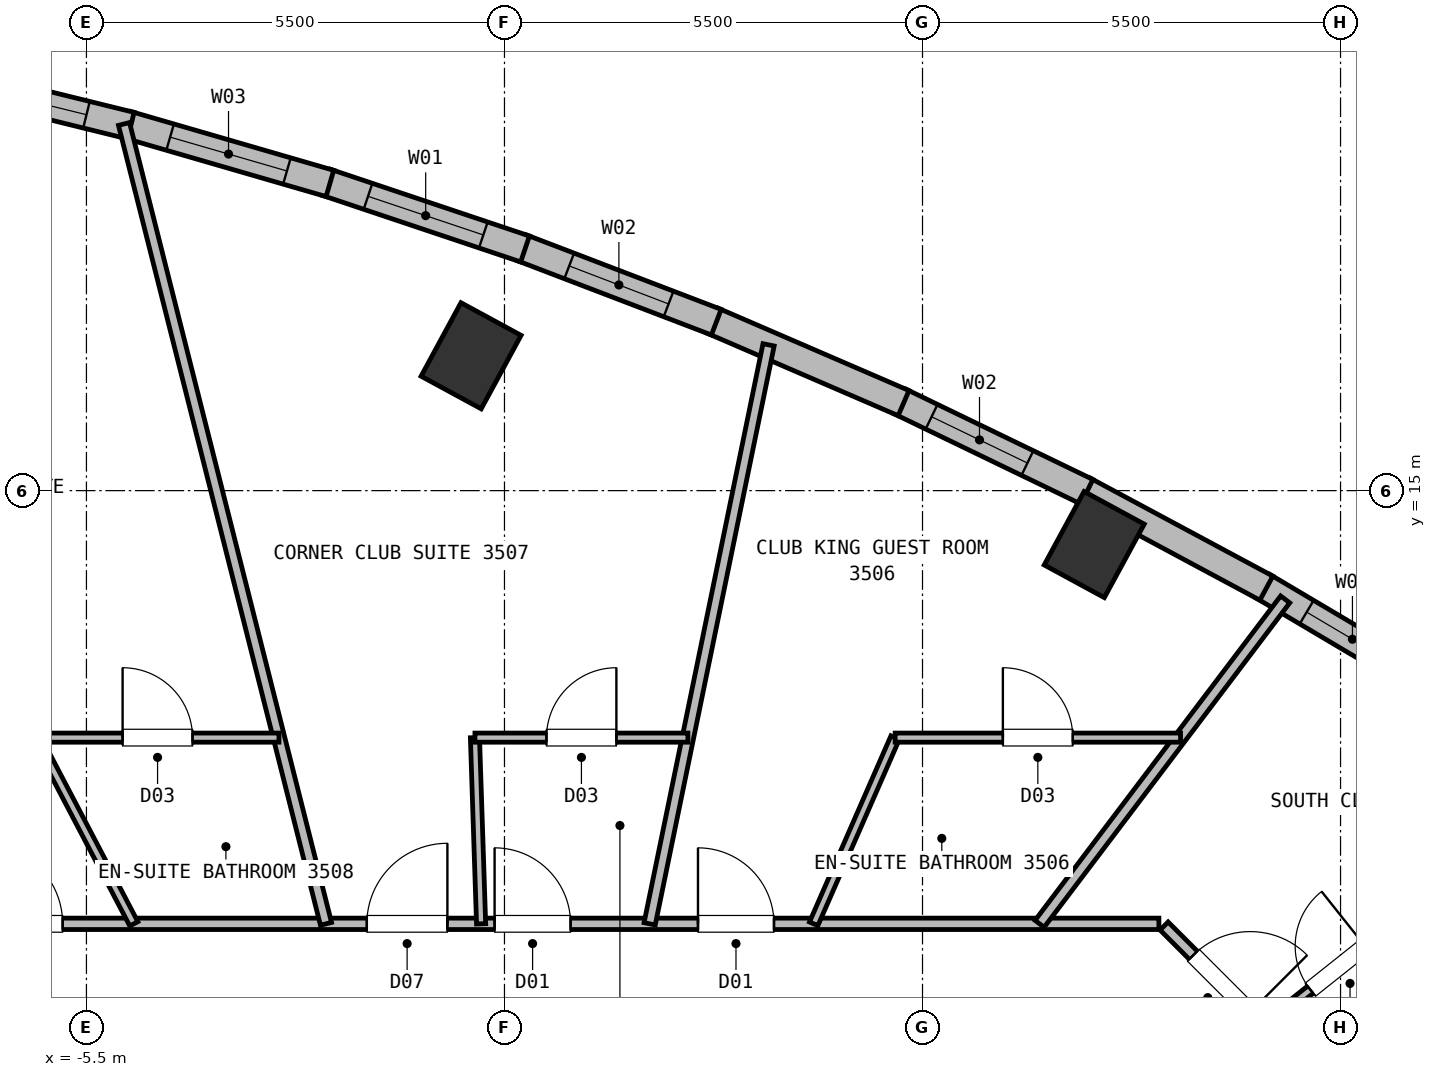
"""IFC4 building model, lengths in metres.
Left out: names, types, materials, properties, quantities, classifications, styles, units other than length and angle.
Written with IfcOpenShell. Run it as: python <this file> out.ifc"""

import sys

from ifc_helpers import new_model, si_unit, direction, frame, frame_2d, origin, origin_2d, place, context, subcontext, project, spatial, rectangle, extrude, element, fill, save


model = new_model("IFC4")
c1 = context("Model", 3, precision=1e-05, world=origin(), true_north=direction((0.0, 1.0)))
c2 = subcontext(c1, "Body", "Model", "MODEL_VIEW")
j1 = project(units=[si_unit("LENGTHUNIT", "METRE"), si_unit("PLANEANGLEUNIT", "RADIAN")], contexts=[c1])
p1 = place(None, origin())
s1 = spatial("IfcSite", under=j1, at=p1, CompositionType="ELEMENT")
p2 = place(p1, origin())
s2 = spatial("IfcBuilding", under=s1, at=p2, CompositionType="ELEMENT")
p3 = place(p2, frame((0.0, 0.0, 131.0)))
s3 = spatial("IfcBuildingStorey", under=s2, at=p3, CompositionType="ELEMENT", Elevation=131.0)
for number, where, z_axis, x_axis in (
    (1, (7.759, 14.29, 0.0), (0.0, 0.0, 1.0), (-0.879, 0.477, 0.0)),
    (2, (-0.439, 16.774, 0.0), (0.0, 0.0, 1.0), (-0.879, 0.477, 0.0)),
):
    element("IfcColumn", number, at=place(p3, frame(where, z_axis=z_axis, x_axis=x_axis)), inside=s3, PredefinedType="COLUMN", context=c2, shape_type="SweptSolid", body=[
        extrude(rectangle(XDim=0.9, YDim=1.1, at=origin_2d()), origin(), (0.0, 0.0, 1.0), 3.75),
    ])
p4 = place(p3, frame((9.98, 13.741, 0.0), z_axis=(0.0, 0.0, 1.0), x_axis=(0.860339389624, -0.509721624675, 0.0)))
e3 = element("IfcWall", 3, at=p4, inside=s3, PredefinedType="SOLIDWALL", context=c2, shape_type="SweptSolid", body=[
    extrude(rectangle(XDim=2.734, YDim=0.36, at=frame_2d((1.367, 0.0))), origin(), (0.0, 0.0, 1.0), 3.5),
])
p5 = place(p4, frame((0.667, 0.0, 0.72)))
e4 = element("IfcOpeningElement", 4, at=p5, cuts=e3, PredefinedType="OPENING", context=c2, shape_type="SweptSolid", body=[
    extrude(rectangle(XDim=1.4, YDim=1.84, at=frame_2d((0.7, 0.92))), frame((0.0, 0.19, 0.0), z_axis=(0.0, -1.0, 0.0), x_axis=(1.0, 0.0, 0.0)), (0.0, 0.0, 1.0), 0.38),
])
p6 = place(p3, frame((7.619, 15.008, 0.0), z_axis=(0.0, 0.0, 1.0), x_axis=(0.881156632258, -0.472824480572, 0.0)))
e5 = element("IfcWall", 5, at=p6, inside=s3, PredefinedType="SOLIDWALL", context=c2, shape_type="SweptSolid", body=[
    extrude(rectangle(XDim=2.729, YDim=0.36, at=frame_2d((1.365, 0.0))), origin(), (0.0, 0.0, 1.0), 3.5),
])
p7 = place(p3, frame((5.205, 16.172, 0.0), z_axis=(0.0, 0.0, 1.0), x_axis=(0.900444136685, -0.434971673458, 0.0)))
e6 = element("IfcWall", 6, at=p7, inside=s3, PredefinedType="SOLIDWALL", context=c2, shape_type="SweptSolid", body=[
    extrude(rectangle(XDim=2.729, YDim=0.36, at=frame_2d((1.365, 0.0))), origin(), (0.0, 0.0, 1.0), 3.5),
])
p8 = place(p7, frame((0.46, 0.0, 0.72)))
e7 = element("IfcOpeningElement", 7, at=p8, cuts=e6, PredefinedType="OPENING", context=c2, shape_type="SweptSolid", body=[
    extrude(rectangle(XDim=1.4, YDim=1.84, at=frame_2d((0.7, 0.92))), frame((0.0, 0.19, 0.0), z_axis=(0.0, -1.0, 0.0), x_axis=(1.0, 0.0, 0.0)), (0.0, 0.0, 1.0), 0.38),
])
p9 = place(p3, frame((2.74, 17.235, 0.0), z_axis=(0.0, 0.0, 1.0), x_axis=(0.918107397743, -0.396331687113, 0.0)))
e8 = element("IfcWall", 8, at=p9, inside=s3, PredefinedType="SOLIDWALL", context=c2, shape_type="SweptSolid", body=[
    extrude(rectangle(XDim=2.734, YDim=0.36, at=frame_2d((1.367, 0.0))), origin(), (0.0, 0.0, 1.0), 3.5),
])
p10 = place(p3, frame((0.224, 18.197, 0.0), z_axis=(0.0, 0.0, 1.0), x_axis=(0.933979359079, -0.357326960661, 0.0)))
e9 = element("IfcWall", 9, at=p10, inside=s3, PredefinedType="SOLIDWALL", context=c2, shape_type="SweptSolid", body=[
    extrude(rectangle(XDim=2.744, YDim=0.36, at=frame_2d((1.372, 0.0))), origin(), (0.0, 0.0, 1.0), 3.5),
])
p11 = place(p10, frame((0.672, 0.0, 0.72)))
e10 = element("IfcOpeningElement", 10, at=p11, cuts=e9, PredefinedType="OPENING", context=c2, shape_type="SweptSolid", body=[
    extrude(rectangle(XDim=1.4, YDim=1.84, at=frame_2d((0.7, 0.92))), frame((0.0, 0.19, 0.0), z_axis=(0.0, -1.0, 0.0), x_axis=(1.0, 0.0, 0.0)), (0.0, 0.0, 1.0), 0.38),
])
p12 = place(p3, frame((-2.344, 19.057, 0.0), z_axis=(0.0, 0.0, 1.0), x_axis=(0.948124259455, -0.317899966393, 0.0)))
e11 = element("IfcWall", 11, at=p12, inside=s3, PredefinedType="SOLIDWALL", context=c2, shape_type="SweptSolid", body=[
    extrude(rectangle(XDim=2.759, YDim=0.36, at=frame_2d((1.379, 0.0))), origin(), (0.0, 0.0, 1.0), 3.5),
])
p13 = place(p12, frame((0.579, 0.0, 0.72)))
e12 = element("IfcOpeningElement", 12, at=p13, cuts=e11, PredefinedType="OPENING", context=c2, shape_type="SweptSolid", body=[
    extrude(rectangle(XDim=1.6, YDim=1.88, at=frame_2d((0.8, 0.94))), frame((0.0, 0.19, 0.0), z_axis=(0.0, -1.0, 0.0), x_axis=(1.0, 0.0, 0.0)), (0.0, 0.0, 1.0), 0.38),
])
p14 = place(p3, frame((-4.964, 19.815, 0.0), z_axis=(0.0, 0.0, 1.0), x_axis=(0.960441835692, -0.278480664056, 0.0)))
e13 = element("IfcWall", 13, at=p14, inside=s3, PredefinedType="SOLIDWALL", context=c2, shape_type="SweptSolid", body=[
    extrude(rectangle(XDim=2.777, YDim=0.36, at=frame_2d((1.389, 0.0))), origin(), (0.0, 0.0, 1.0), 3.5),
])
p15 = place(p14, frame((0.589, 0.0, 0.72)))
e14 = element("IfcOpeningElement", 14, at=p15, cuts=e13, PredefinedType="OPENING", context=c2, shape_type="SweptSolid", body=[
    extrude(rectangle(XDim=1.6, YDim=1.88, at=frame_2d((0.8, 0.94))), frame((0.0, 0.19, 0.0), z_axis=(0.0, -1.0, 0.0), x_axis=(1.0, 0.0, 0.0)), (0.0, 0.0, 1.0), 0.38),
])
p16 = place(p3, frame((-7.636, 20.472, 0.0), z_axis=(0.0, 0.0, 1.0), x_axis=(0.970982505779, -0.239150524716, 0.0)))
e15 = element("IfcWall", 15, at=p16, inside=s3, PredefinedType="SOLIDWALL", context=c2, shape_type="SweptSolid", body=[
    extrude(rectangle(XDim=2.801, YDim=0.36, at=frame_2d((1.401, 0.0))), origin(), (0.0, 0.0, 1.0), 3.5),
])
p17 = place(p16, frame((0.601, 0.0, 0.72)))
e16 = element("IfcOpeningElement", 16, at=p17, cuts=e15, PredefinedType="OPENING", context=c2, shape_type="SweptSolid", body=[
    extrude(rectangle(XDim=1.6, YDim=1.88, at=frame_2d((0.8, 0.94))), frame((0.0, 0.19, 0.0), z_axis=(0.0, -1.0, 0.0), x_axis=(1.0, 0.0, 0.0)), (0.0, 0.0, 1.0), 0.38),
])
p18 = place(p3, frame((8.678, 9.272, 0.0), z_axis=(0.0, 0.0, 1.0), x_axis=(0.707106781187, -0.707106781187, 0.0)))
e17 = element("IfcWall", 17, at=p18, inside=s3, PredefinedType="PARTITIONING", context=c2, shape_type="SweptSolid", body=[
    extrude(rectangle(XDim=2.89, YDim=0.15, at=frame_2d((1.445, 0.0))), origin(), (0.0, 0.0, 1.0), 3.5),
])
p19 = place(p18, frame((0.543, 0.0, 0.0)))
e18 = element("IfcOpeningElement", 18, at=p19, cuts=e17, PredefinedType="OPENING", context=c2, shape_type="SweptSolid", body=[
    extrude(rectangle(XDim=1.06, YDim=2.15, at=frame_2d((0.53, 1.075))), frame((0.0, 0.085, 0.0), z_axis=(0.0, -1.0, 0.0), x_axis=(1.0, 0.0, 0.0)), (0.0, 0.0, 1.0), 0.17),
])
p20 = place(p3, frame((-8.61, 9.3, 0.0), z_axis=(0.0, 0.0, 1.0), x_axis=(1.0, 0.0, 0.0)))
e19 = element("IfcWall", 19, at=p20, inside=s3, PredefinedType="PARTITIONING", context=c2, shape_type="SweptSolid", body=[
    extrude(rectangle(XDim=17.22, YDim=0.15, at=frame_2d((8.61, 0.0))), origin(), (0.0, 0.0, 1.0), 3.5),
])
p21 = place(p20, frame((11.156, 0.0, 0.0)))
e20 = element("IfcOpeningElement", 20, at=p21, cuts=e19, PredefinedType="OPENING", context=c2, shape_type="SweptSolid", body=[
    extrude(rectangle(XDim=1.0, YDim=2.15, at=frame_2d((0.5, 1.075))), frame((0.0, 0.085, 0.0), z_axis=(0.0, -1.0, 0.0), x_axis=(1.0, 0.0, 0.0)), (0.0, 0.0, 1.0), 0.17),
])
p22 = place(p20, frame((6.799, 0.0, 0.0)))
e21 = element("IfcOpeningElement", 21, at=p22, cuts=e19, PredefinedType="OPENING", context=c2, shape_type="SweptSolid", body=[
    extrude(rectangle(XDim=1.06, YDim=2.15, at=frame_2d((0.53, 1.075))), frame((0.0, 0.085, 0.0), z_axis=(0.0, -1.0, 0.0), x_axis=(1.0, 0.0, 0.0)), (0.0, 0.0, 1.0), 0.17),
])
p23 = place(p20, frame((1.737, 0.0, 0.0)))
e22 = element("IfcOpeningElement", 22, at=p23, cuts=e19, PredefinedType="OPENING", context=c2, shape_type="SweptSolid", body=[
    extrude(rectangle(XDim=1.06, YDim=2.15, at=frame_2d((0.53, 1.075))), frame((0.0, 0.085, 0.0), z_axis=(0.0, -1.0, 0.0), x_axis=(1.0, 0.0, 0.0)), (0.0, 0.0, 1.0), 0.17),
])
p24 = place(p20, frame((8.48, 0.0, 0.0)))
e23 = element("IfcOpeningElement", 23, at=p24, cuts=e19, PredefinedType="OPENING", context=c2, shape_type="SweptSolid", body=[
    extrude(rectangle(XDim=1.0, YDim=2.15, at=frame_2d((0.5, 1.075))), frame((0.0, 0.085, 0.0), z_axis=(0.0, -1.0, 0.0), x_axis=(1.0, 0.0, 0.0)), (0.0, 0.0, 1.0), 0.17),
])
p25 = place(p3, frame((10.75, 5.012, 0.0), z_axis=(0.0, 0.0, 1.0), x_axis=(0.90633944919, 0.422550355393, 0.0)))
e24 = element("IfcWall", 24, at=p25, inside=s3, PredefinedType="PARTITIONING", context=c2, shape_type="SweptSolid", body=[
    extrude(rectangle(XDim=7.977, YDim=0.15, at=frame_2d((3.989, 0.0))), origin(), (0.0, 0.0, 1.0), 3.5),
])
p26 = place(p3, frame((9.998, 7.952, 0.0), z_axis=(0.0, 0.0, 1.0), x_axis=(0.782652575374, 0.622458790813, 0.0)))
e25 = element("IfcWall", 25, at=p26, inside=s3, PredefinedType="PARTITIONING", context=c2, shape_type="SweptSolid", body=[
    extrude(rectangle(XDim=2.466, YDim=0.12, at=frame_2d((1.233, 0.0))), origin(), (0.0, 0.0, 1.0), 3.5),
])
p27 = place(p26, frame((0.773, 0.0, 0.0)))
e26 = element("IfcOpeningElement", 26, at=p27, cuts=e25, PredefinedType="OPENING", context=c2, shape_type="SweptSolid", body=[
    extrude(rectangle(XDim=0.92, YDim=2.1, at=frame_2d((0.46, 1.05))), frame((0.0, 0.07, 0.0), z_axis=(0.0, -1.0, 0.0), x_axis=(1.0, 0.0, 0.0)), (0.0, 0.0, 1.0), 0.14),
])
p28 = place(p3, frame((7.04, 9.3, 0.0), z_axis=(0.0, 0.0, 1.0), x_axis=(0.603561778398, 0.797316235667, 0.0)))
e27 = element("IfcWall", 27, at=p28, inside=s3, PredefinedType="PARTITIONING", context=c2, shape_type="SweptSolid", body=[
    extrude(rectangle(XDim=5.354, YDim=0.15, at=frame_2d((2.677, 0.0))), origin(), (0.0, 0.0, 1.0), 3.5),
])
p29 = place(p3, frame((4.068, 9.3, 0.0), z_axis=(0.0, 0.0, 1.0), x_axis=(0.400794887066, 0.916167811322, 0.0)))
e28 = element("IfcWall", 28, at=p29, inside=s3, PredefinedType="PARTITIONING", context=c2, shape_type="SweptSolid", body=[
    extrude(rectangle(XDim=2.674, YDim=0.12, at=frame_2d((1.337, 0.0))), origin(), (0.0, 0.0, 1.0), 3.5),
])
p30 = place(p3, frame((5.14, 11.75, 0.0), z_axis=(0.0, 0.0, 1.0), x_axis=(1.0, 0.0, 0.0)))
e29 = element("IfcWall", 29, at=p30, inside=s3, PredefinedType="PARTITIONING", context=c2, shape_type="SweptSolid", body=[
    extrude(rectangle(XDim=3.755, YDim=0.12, at=frame_2d((1.877, 0.0))), origin(), (0.0, 0.0, 1.0), 3.5),
])
p31 = place(p30, frame((1.417, 0.0, 0.0)))
e30 = element("IfcOpeningElement", 30, at=p31, cuts=e29, PredefinedType="OPENING", context=c2, shape_type="SweptSolid", body=[
    extrude(rectangle(XDim=0.92, YDim=2.1, at=frame_2d((0.46, 1.05))), frame((0.0, 0.07, 0.0), z_axis=(0.0, -1.0, 0.0), x_axis=(1.0, 0.0, 0.0)), (0.0, 0.0, 1.0), 0.14),
])
p32 = place(p3, frame((1.91, 9.3, 0.0), z_axis=(0.0, 0.0, 1.0), x_axis=(0.201190538841, 0.97955212576, 0.0)))
e31 = element("IfcWall", 31, at=p32, inside=s3, PredefinedType="PARTITIONING", context=c2, shape_type="SweptSolid", body=[
    extrude(rectangle(XDim=7.777, YDim=0.15, at=frame_2d((3.889, 0.0))), origin(), (0.0, 0.0, 1.0), 3.5),
])
p33 = place(p3, frame((-0.308, 9.3, 0.0), z_axis=(0.0, 0.0, 1.0), x_axis=(-0.032966625408, 0.999456453083, 0.0)))
e32 = element("IfcWall", 32, at=p33, inside=s3, PredefinedType="PARTITIONING", context=c2, shape_type="SweptSolid", body=[
    extrude(rectangle(XDim=2.451, YDim=0.12, at=frame_2d((1.226, 0.0))), origin(), (0.0, 0.0, 1.0), 3.5),
])
p34 = place(p3, frame((-0.388, 11.75, 0.0), z_axis=(0.0, 0.0, 1.0), x_axis=(1.0, 0.0, 0.0)))
e33 = element("IfcWall", 33, at=p34, inside=s3, PredefinedType="PARTITIONING", context=c2, shape_type="SweptSolid", body=[
    extrude(rectangle(XDim=2.802, YDim=0.12, at=frame_2d((1.401, 0.0))), origin(), (0.0, 0.0, 1.0), 3.5),
])
p35 = place(p34, frame((0.941, 0.0, 0.0)))
e34 = element("IfcOpeningElement", 34, at=p35, cuts=e33, PredefinedType="OPENING", context=c2, shape_type="SweptSolid", body=[
    extrude(rectangle(XDim=0.92, YDim=2.1, at=frame_2d((0.46, 1.05))), frame((0.0, 0.07, 0.0), z_axis=(0.0, -1.0, 0.0), x_axis=(1.0, 0.0, 0.0)), (0.0, 0.0, 1.0), 0.14),
])
p36 = place(p3, frame((-2.348, 9.3, 0.0), z_axis=(0.0, 0.0, 1.0), x_axis=(-0.244821157428, 0.969568254882, 0.0)))
e35 = element("IfcWall", 35, at=p36, inside=s3, PredefinedType="PARTITIONING", context=c2, shape_type="SweptSolid", body=[
    extrude(rectangle(XDim=10.855, YDim=0.15, at=frame_2d((5.427, 0.0))), origin(), (0.0, 0.0, 1.0), 3.5),
])
p37 = place(p3, frame((-6.161, 11.75, 0.0), z_axis=(0.0, 0.0, 1.0), x_axis=(0.464392787292, -0.885629346347, 0.0)))
e36 = element("IfcWall", 36, at=p37, inside=s3, PredefinedType="PARTITIONING", context=c2, shape_type="SweptSolid", body=[
    extrude(rectangle(XDim=2.766, YDim=0.12, at=frame_2d((1.383, 0.0))), origin(), (0.0, 0.0, 1.0), 3.5),
])
p38 = place(p3, frame((-6.161, 11.75, 0.0), z_axis=(0.0, 0.0, 1.0), x_axis=(1.0, 0.0, 0.0)))
e37 = element("IfcWall", 37, at=p38, inside=s3, PredefinedType="PARTITIONING", context=c2, shape_type="SweptSolid", body=[
    extrude(rectangle(XDim=3.194, YDim=0.12, at=frame_2d((1.597, 0.0))), origin(), (0.0, 0.0, 1.0), 3.5),
])
p39 = place(p38, frame((1.137, 0.0, 0.0)))
e38 = element("IfcOpeningElement", 38, at=p39, cuts=e37, PredefinedType="OPENING", context=c2, shape_type="SweptSolid", body=[
    extrude(rectangle(XDim=0.92, YDim=2.1, at=frame_2d((0.46, 1.05))), frame((0.0, 0.07, 0.0), z_axis=(0.0, -1.0, 0.0), x_axis=(1.0, 0.0, 0.0)), (0.0, 0.0, 1.0), 0.14),
])
p40 = place(p5, origin())
e39 = element("IfcWindow", 39, at=p40, inside=s3, PartitioningType="SINGLE_PANEL", PredefinedType="WINDOW", context=c2, shape_type="SweptSolid", body=[
    extrude(rectangle(XDim=1.4, YDim=1.84, at=frame_2d((0.7, 0.92))), frame((0.0, 0.03, 0.0), z_axis=(0.0, -1.0, 0.0), x_axis=(1.0, 0.0, 0.0)), (0.0, 0.0, 1.0), 0.06),
])
fill(e4, e39)
p41 = place(p8, origin())
e40 = element("IfcWindow", 40, at=p41, inside=s3, PartitioningType="SINGLE_PANEL", PredefinedType="WINDOW", context=c2, shape_type="SweptSolid", body=[
    extrude(rectangle(XDim=1.4, YDim=1.84, at=frame_2d((0.7, 0.92))), frame((0.0, 0.03, 0.0), z_axis=(0.0, -1.0, 0.0), x_axis=(1.0, 0.0, 0.0)), (0.0, 0.0, 1.0), 0.06),
])
fill(e7, e40)
p42 = place(p11, origin())
e41 = element("IfcWindow", 41, at=p42, inside=s3, PartitioningType="SINGLE_PANEL", PredefinedType="WINDOW", context=c2, shape_type="SweptSolid", body=[
    extrude(rectangle(XDim=1.4, YDim=1.84, at=frame_2d((0.7, 0.92))), frame((0.0, 0.03, 0.0), z_axis=(0.0, -1.0, 0.0), x_axis=(1.0, 0.0, 0.0)), (0.0, 0.0, 1.0), 0.06),
])
fill(e10, e41)
p43 = place(p13, origin())
e42 = element("IfcWindow", 42, at=p43, inside=s3, PartitioningType="SINGLE_PANEL", PredefinedType="WINDOW", context=c2, shape_type="SweptSolid", body=[
    extrude(rectangle(XDim=1.6, YDim=1.88, at=frame_2d((0.8, 0.94))), frame((0.0, 0.03, 0.0), z_axis=(0.0, -1.0, 0.0), x_axis=(1.0, 0.0, 0.0)), (0.0, 0.0, 1.0), 0.06),
])
fill(e12, e42)
p44 = place(p15, origin())
e43 = element("IfcWindow", 43, at=p44, inside=s3, PartitioningType="SINGLE_PANEL", PredefinedType="WINDOW", context=c2, shape_type="SweptSolid", body=[
    extrude(rectangle(XDim=1.6, YDim=1.88, at=frame_2d((0.8, 0.94))), frame((0.0, 0.03, 0.0), z_axis=(0.0, -1.0, 0.0), x_axis=(1.0, 0.0, 0.0)), (0.0, 0.0, 1.0), 0.06),
])
fill(e14, e43)
p45 = place(p17, origin())
e44 = element("IfcWindow", 44, at=p45, inside=s3, PartitioningType="SINGLE_PANEL", PredefinedType="WINDOW", context=c2, shape_type="SweptSolid", body=[
    extrude(rectangle(XDim=1.6, YDim=1.88, at=frame_2d((0.8, 0.94))), frame((0.0, 0.03, 0.0), z_axis=(0.0, -1.0, 0.0), x_axis=(1.0, 0.0, 0.0)), (0.0, 0.0, 1.0), 0.06),
])
fill(e16, e44)
p46 = place(p27, origin())
e45 = element("IfcDoor", 45, at=p46, inside=s3, OperationType="SINGLE_SWING_RIGHT", PredefinedType="DOOR", context=c2, shape_type="SweptSolid", body=[
    extrude(rectangle(XDim=0.92, YDim=2.1, at=frame_2d((0.46, 1.05))), frame((0.0, 0.025, 0.0), z_axis=(0.0, -1.0, 0.0), x_axis=(1.0, 0.0, 0.0)), (0.0, 0.0, 1.0), 0.05),
])
fill(e26, e45)
p47 = place(p31, origin())
e46 = element("IfcDoor", 46, at=p47, inside=s3, OperationType="SINGLE_SWING_LEFT", PredefinedType="DOOR", context=c2, shape_type="SweptSolid", body=[
    extrude(rectangle(XDim=0.92, YDim=2.1, at=frame_2d((0.46, 1.05))), frame((0.0, 0.025, 0.0), z_axis=(0.0, -1.0, 0.0), x_axis=(1.0, 0.0, 0.0)), (0.0, 0.0, 1.0), 0.05),
])
fill(e30, e46)
p48 = place(p35, origin())
e47 = element("IfcDoor", 47, at=p48, inside=s3, OperationType="SINGLE_SWING_RIGHT", PredefinedType="DOOR", context=c2, shape_type="SweptSolid", body=[
    extrude(rectangle(XDim=0.92, YDim=2.1, at=frame_2d((0.46, 1.05))), frame((0.0, 0.025, 0.0), z_axis=(0.0, -1.0, 0.0), x_axis=(1.0, 0.0, 0.0)), (0.0, 0.0, 1.0), 0.05),
])
fill(e34, e47)
p49 = place(p39, origin())
e48 = element("IfcDoor", 48, at=p49, inside=s3, OperationType="SINGLE_SWING_LEFT", PredefinedType="DOOR", context=c2, shape_type="SweptSolid", body=[
    extrude(rectangle(XDim=0.92, YDim=2.1, at=frame_2d((0.46, 1.05))), frame((0.0, 0.025, 0.0), z_axis=(0.0, -1.0, 0.0), x_axis=(1.0, 0.0, 0.0)), (0.0, 0.0, 1.0), 0.05),
])
fill(e38, e48)
p50 = place(p21, origin())
e49 = element("IfcDoor", 49, at=p50, inside=s3, OperationType="SINGLE_SWING_LEFT", PredefinedType="DOOR", context=c2, shape_type="SweptSolid", body=[
    extrude(rectangle(XDim=1.0, YDim=2.15, at=frame_2d((0.5, 1.075))), frame((0.0, 0.025, 0.0), z_axis=(0.0, -1.0, 0.0), x_axis=(1.0, 0.0, 0.0)), (0.0, 0.0, 1.0), 0.05),
])
fill(e20, e49)
p51 = place(p19, origin())
e50 = element("IfcDoor", 50, at=p51, inside=s3, OperationType="SINGLE_SWING_RIGHT", PredefinedType="DOOR", context=c2, shape_type="SweptSolid", body=[
    extrude(rectangle(XDim=1.06, YDim=2.15, at=frame_2d((0.53, 1.075))), frame((0.0, 0.025, 0.0), z_axis=(0.0, -1.0, 0.0), x_axis=(1.0, 0.0, 0.0)), (0.0, 0.0, 1.0), 0.05),
])
fill(e18, e50)
p52 = place(p22, origin())
e51 = element("IfcDoor", 51, at=p52, inside=s3, OperationType="SINGLE_SWING_RIGHT", PredefinedType="DOOR", context=c2, shape_type="SweptSolid", body=[
    extrude(rectangle(XDim=1.06, YDim=2.15, at=frame_2d((0.53, 1.075))), frame((0.0, 0.025, 0.0), z_axis=(0.0, -1.0, 0.0), x_axis=(1.0, 0.0, 0.0)), (0.0, 0.0, 1.0), 0.05),
])
fill(e21, e51)
p53 = place(p23, origin())
e52 = element("IfcDoor", 52, at=p53, inside=s3, OperationType="SINGLE_SWING_LEFT", PredefinedType="DOOR", context=c2, shape_type="SweptSolid", body=[
    extrude(rectangle(XDim=1.06, YDim=2.15, at=frame_2d((0.53, 1.075))), frame((0.0, 0.025, 0.0), z_axis=(0.0, -1.0, 0.0), x_axis=(1.0, 0.0, 0.0)), (0.0, 0.0, 1.0), 0.05),
])
fill(e22, e52)
p54 = place(p24, origin())
e53 = element("IfcDoor", 53, at=p54, inside=s3, OperationType="SINGLE_SWING_LEFT", PredefinedType="DOOR", context=c2, shape_type="SweptSolid", body=[
    extrude(rectangle(XDim=1.0, YDim=2.15, at=frame_2d((0.5, 1.075))), frame((0.0, 0.025, 0.0), z_axis=(0.0, -1.0, 0.0), x_axis=(1.0, 0.0, 0.0)), (0.0, 0.0, 1.0), 0.05),
])
fill(e23, e53)
save(model, sys.argv[1])
